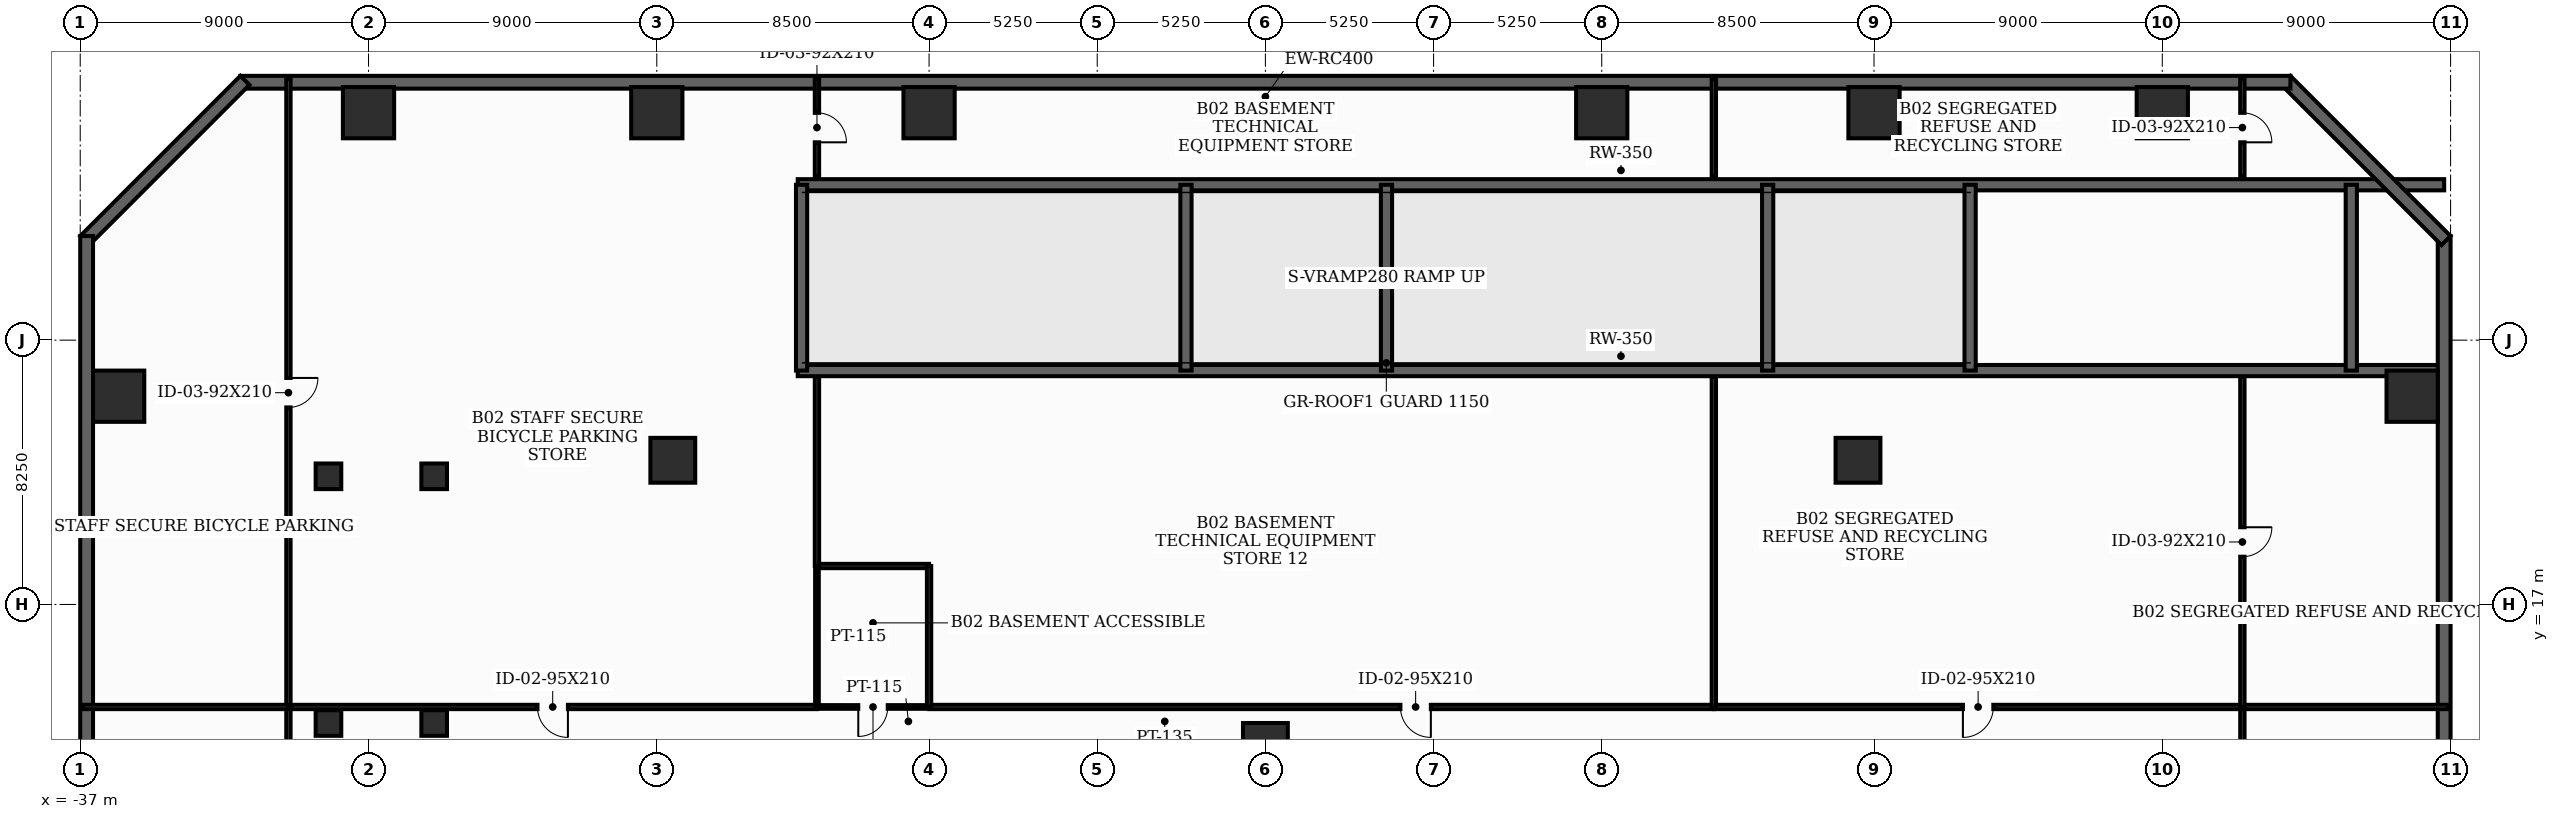
"""IFC4 building model, lengths in metres.
Left out: names, types, materials, properties, quantities, classifications, styles, units other than length and angle.
Written with IfcOpenShell. Run it as: python <this file> out.ifc"""

import sys

from ifc_helpers import new_model, si_unit, direction, frame, frame_2d, origin, origin_2d, place, context, subcontext, project, spatial, rectangle, extrude, element, fill, save


model = new_model("IFC4")
c1 = context("Model", 3, precision=1e-05, world=origin(), true_north=direction((0.0, 1.0)))
c2 = subcontext(c1, "Body", "Model", "MODEL_VIEW")
j1 = project(units=[si_unit("LENGTHUNIT", "METRE"), si_unit("PLANEANGLEUNIT", "RADIAN")], contexts=[c1])
p1 = place(None, origin())
s1 = spatial("IfcSite", under=j1, at=p1, CompositionType="ELEMENT")
p2 = place(p1, origin())
s2 = spatial("IfcBuilding", under=s1, at=p2, CompositionType="ELEMENT")
p3 = place(p2, frame((0.0, 0.0, -9.6)))
s3 = spatial("IfcBuildingStorey", under=s2, at=p3, CompositionType="ELEMENT", Elevation=-9.6)
p4 = place(p3, frame((0.0, 12.6, 0.0), z_axis=(0.0, 0.0, 1.0), x_axis=(1.0, 0.0, 0.0)))
e1 = element("IfcColumn", 1, at=p4, inside=s3, PredefinedType="COLUMN", context=c2, shape_type="SweptSolid", body=[
    extrude(rectangle(XDim=1.4, YDim=1.4, at=origin_2d()), origin(), (0.0, 0.0, 1.0), 4.8),
])
for number, where, z_axis, x_axis in (
    (2, (35.8, 23.5, 0.0), (0.0, 0.0, 1.0), (1.0, 0.0, 0.0)),
    (3, (28.0, 32.35, 0.0), (0.0, 0.0, 1.0), (1.0, 0.0, 0.0)),
    (4, (19.0, 32.35, 0.0), (0.0, 0.0, 1.0), (1.0, 0.0, 0.0)),
    (5, (10.5, 32.35, 0.0), (0.0, 0.0, 1.0), (1.0, 0.0, 0.0)),
    (6, (-10.5, 32.35, 0.0), (0.0, 0.0, 1.0), (1.0, 0.0, 0.0)),
    (7, (-19.0, 32.35, 0.0), (0.0, 0.0, 1.0), (1.0, 0.0, 0.0)),
    (8, (-28.0, 32.35, 0.0), (0.0, 0.0, 1.0), (1.0, 0.0, 0.0)),
    (9, (-35.8, 23.5, 0.0), (0.0, 0.0, 1.0), (1.0, 0.0, 0.0)),
):
    element("IfcColumn", number, at=place(p3, frame(where, z_axis=z_axis, x_axis=x_axis)), inside=s3, PredefinedType="COLUMN", context=c2, shape_type="SweptSolid", body=[
        extrude(rectangle(XDim=1.6, YDim=1.6, at=origin_2d()), origin(), (0.0, 0.0, 1.0), 4.8),
    ])
for number, where, z_axis, x_axis in (
    (10, (-18.5, 21.5, 0.0), (0.0, 0.0, 1.0), (1.0, 0.0, 0.0)),
    (11, (18.5, 21.5, 0.0), (0.0, 0.0, 1.0), (1.0, 0.0, 0.0)),
):
    element("IfcColumn", number, at=place(p3, frame(where, z_axis=z_axis, x_axis=x_axis)), inside=s3, PredefinedType="COLUMN", context=c2, shape_type="SweptSolid", body=[
        extrude(rectangle(XDim=1.4, YDim=1.4, at=origin_2d()), origin(), (0.0, 0.0, 1.0), 4.8),
    ])
for number, where, z_axis, x_axis in (
    (12, (-29.25, 13.3, 0.0), (0.0, 0.0, 1.0), (1.0, 0.0, 0.0)),
    (13, (-25.95, 13.3, 0.0), (0.0, 0.0, 1.0), (1.0, 0.0, 0.0)),
    (14, (-25.95, 21.0, 0.0), (0.0, 0.0, 1.0), (1.0, 0.0, 0.0)),
    (15, (-29.25, 21.0, 0.0), (0.0, 0.0, 1.0), (1.0, 0.0, 0.0)),
):
    element("IfcColumn", number, at=place(p3, frame(where, z_axis=z_axis, x_axis=x_axis)), inside=s3, PredefinedType="COLUMN", context=c2, shape_type="SweptSolid", body=[
        extrude(rectangle(XDim=0.8, YDim=0.8, at=origin_2d()), origin(), (0.0, 0.0, 1.0), 4.8),
    ])
for number, where, z_axis, x_axis in (
    (16, (-14.6, 24.3, 0.0), (0.0, 0.0, 1.0), (1.0, 0.0, 0.0)),
    (17, (-14.6, 30.1, 0.0), (0.0, 0.0, 1.0), (1.0, 0.0, 0.0)),
):
    element("IfcWall", number, at=place(p3, frame(where, z_axis=z_axis, x_axis=x_axis)), inside=s3, PredefinedType="SHEAR", context=c2, shape_type="SweptSolid", body=[
        extrude(rectangle(XDim=51.4, YDim=0.35, at=frame_2d((25.7, 0.0))), origin(), (0.0, 0.0, 1.0), 4.52),
    ])
p5 = place(p3, frame((-14.48, 24.3, 0.0), z_axis=(0.0, 0.0, 1.0), x_axis=(0.0, 1.0, 0.0)))
e18 = element("IfcWall", 18, at=p5, inside=s3, PredefinedType="SHEAR", context=c2, shape_type="SweptSolid", body=[
    extrude(rectangle(XDim=5.8, YDim=0.35, at=frame_2d((2.9, 0.0))), origin(), (0.0, 0.0, 1.0), 4.52),
])
p6 = place(p3, frame((22.0, 24.3, 0.0), z_axis=(0.0, 0.0, 1.0), x_axis=(0.0, 1.0, 0.0)))
e19 = element("IfcWall", 19, at=p6, inside=s3, PredefinedType="SHEAR", context=c2, shape_type="SweptSolid", body=[
    extrude(rectangle(XDim=5.8, YDim=0.35, at=frame_2d((2.9, 0.0))), origin(), (0.0, 0.0, 1.0), 1.2),
])
for number, where, z_axis, x_axis in (
    (20, (33.9, 24.3, 0.0), (0.0, 0.0, 1.0), (0.0, 1.0, 0.0)),
    (21, (-2.48, 24.3, 0.0), (0.0, 0.0, 1.0), (0.0, 1.0, 0.0)),
):
    element("IfcWall", number, at=place(p3, frame(where, z_axis=z_axis, x_axis=x_axis)), inside=s3, PredefinedType="SHEAR", context=c2, shape_type="SweptSolid", body=[
        extrude(rectangle(XDim=5.8, YDim=0.35, at=frame_2d((2.9, 0.0))), origin(), (0.0, 0.0, 1.0), 4.52),
    ])
p7 = place(p3, frame((3.78, 24.3, 0.0), z_axis=(0.0, 0.0, 1.0), x_axis=(0.0, 1.0, 0.0)))
e22 = element("IfcWall", 22, at=p7, inside=s3, PredefinedType="SHEAR", context=c2, shape_type="SweptSolid", body=[
    extrude(rectangle(XDim=5.8, YDim=0.35, at=frame_2d((2.9, 0.0))), origin(), (0.0, 0.0, 1.0), 2.1),
])
p8 = place(p3, frame((15.68, 24.3, 0.0), z_axis=(0.0, 0.0, 1.0), x_axis=(0.0, 1.0, 0.0)))
e23 = element("IfcWall", 23, at=p8, inside=s3, PredefinedType="SHEAR", context=c2, shape_type="SweptSolid", body=[
    extrude(rectangle(XDim=5.8, YDim=0.35, at=frame_2d((2.9, 0.0))), origin(), (0.0, 0.0, 1.0), 4.52),
])
p9 = place(p3, frame((36.8, -19.5, 0.0), z_axis=(0.0, 0.0, 1.0), x_axis=(0.0, 1.0, 0.0)))
e24 = element("IfcWall", 24, at=p9, inside=s3, PredefinedType="USERDEFINED", context=c2, shape_type="SweptSolid", body=[
    extrude(rectangle(XDim=48.0, YDim=0.4, at=frame_2d((24.0, 0.0))), origin(), (0.0, 0.0, 1.0), 4.52),
])
p10 = place(p3, frame((36.859, 28.359, 0.0), z_axis=(0.0, 0.0, 1.0), x_axis=(-0.707106781187, 0.707106781187, 0.0)))
e25 = element("IfcWall", 25, at=p10, inside=s3, PredefinedType="USERDEFINED", context=c2, shape_type="SweptSolid", body=[
    extrude(rectangle(XDim=7.071, YDim=0.4, at=frame_2d((3.536, 0.0))), origin(), (0.0, 0.0, 1.0), 4.52),
])
p11 = place(p3, frame((32.0, 33.3, 0.0), z_axis=(0.0, 0.0, 1.0), x_axis=(-1.0, 0.0, 0.0)))
e26 = element("IfcWall", 26, at=p11, inside=s3, PredefinedType="USERDEFINED", context=c2, shape_type="SweptSolid", body=[
    extrude(rectangle(XDim=64.0, YDim=0.4, at=frame_2d((32.0, 0.0))), origin(), (0.0, 0.0, 1.0), 4.52),
])
p12 = place(p3, frame((-31.859, 33.359, 0.0), z_axis=(0.0, 0.0, 1.0), x_axis=(-0.707106781187, -0.707106781187, 0.0)))
e27 = element("IfcWall", 27, at=p12, inside=s3, PredefinedType="USERDEFINED", context=c2, shape_type="SweptSolid", body=[
    extrude(rectangle(XDim=7.071, YDim=0.4, at=frame_2d((3.536, 0.0))), origin(), (0.0, 0.0, 1.0), 4.52),
])
p13 = place(p3, frame((-36.8, 28.5, 0.0), z_axis=(0.0, 0.0, 1.0), x_axis=(0.0, -1.0, 0.0)))
e28 = element("IfcWall", 28, at=p13, inside=s3, PredefinedType="USERDEFINED", context=c2, shape_type="SweptSolid", body=[
    extrude(rectangle(XDim=48.0, YDim=0.4, at=frame_2d((24.0, 0.0))), origin(), (0.0, 0.0, 1.0), 4.52),
])
p14 = place(p3, frame((30.5, 11.75, 0.0), z_axis=(0.0, 0.0, 1.0), x_axis=(0.0, 1.0, 0.0)))
e29 = element("IfcWall", 29, at=p14, inside=s3, PredefinedType="PARTITIONING", context=c2, shape_type="SweptSolid", body=[
    extrude(rectangle(XDim=2.05, YDim=0.135, at=frame_2d((1.025, 0.0))), origin(), (0.0, 0.0, 1.0), 4.52),
])
p15 = place(p3, frame((30.5, 13.8, 0.0), z_axis=(0.0, 0.0, 1.0), x_axis=(-1.0, 0.0, 0.0)))
e30 = element("IfcWall", 30, at=p15, inside=s3, PredefinedType="PARTITIONING", context=c2, shape_type="SweptSolid", body=[
    extrude(rectangle(XDim=16.5, YDim=0.135, at=frame_2d((8.25, 0.0))), origin(), (0.0, 0.0, 1.0), 3.805),
])
p16 = place(p15, frame((7.775, 0.0, 0.0)))
e31 = element("IfcOpeningElement", 31, at=p16, cuts=e30, PredefinedType="OPENING", context=c2, shape_type="SweptSolid", body=[
    extrude(rectangle(XDim=0.95, YDim=2.1, at=frame_2d((0.475, 1.05))), frame((0.0, 0.077, 0.0), z_axis=(0.0, -1.0, 0.0), x_axis=(1.0, 0.0, 0.0)), (0.0, 0.0, 1.0), 0.155),
])
p17 = place(p3, frame((14.0, 13.8, 0.0), z_axis=(0.0, 0.0, 1.0), x_axis=(-1.0, 0.0, 0.0)))
e32 = element("IfcWall", 32, at=p17, inside=s3, PredefinedType="PARTITIONING", context=c2, shape_type="SweptSolid", body=[
    extrude(rectangle(XDim=24.5, YDim=0.135, at=frame_2d((12.25, 0.0))), origin(), (0.0, 0.0, 1.0), 3.305),
])
p18 = place(p17, frame((8.835, 0.0, 0.0)))
e33 = element("IfcOpeningElement", 33, at=p18, cuts=e32, PredefinedType="OPENING", context=c2, shape_type="SweptSolid", body=[
    extrude(rectangle(XDim=0.95, YDim=2.1, at=frame_2d((0.475, 1.05))), frame((0.0, 0.077, 0.0), z_axis=(0.0, -1.0, 0.0), x_axis=(1.0, 0.0, 0.0)), (0.0, 0.0, 1.0), 0.155),
])
p19 = place(p3, frame((-10.5, 13.8, 0.0), z_axis=(0.0, 0.0, 1.0), x_axis=(-1.0, 0.0, 0.0)))
e34 = element("IfcWall", 34, at=p19, inside=s3, PredefinedType="PARTITIONING", context=c2, shape_type="SweptSolid", body=[
    extrude(rectangle(XDim=3.5, YDim=0.115, at=frame_2d((1.75, 0.0))), origin(), (0.0, 0.0, 1.0), 4.52),
])
p20 = place(p19, frame((1.29, 0.0, 0.0)))
e35 = element("IfcOpeningElement", 35, at=p20, cuts=e34, PredefinedType="OPENING", context=c2, shape_type="SweptSolid", body=[
    extrude(rectangle(XDim=0.92, YDim=2.1, at=frame_2d((0.46, 1.05))), frame((0.0, 0.067, 0.0), z_axis=(0.0, -1.0, 0.0), x_axis=(1.0, 0.0, 0.0)), (0.0, 0.0, 1.0), 0.135),
])
p21 = place(p3, frame((-14.0, 13.8, 0.0), z_axis=(0.0, 0.0, 1.0), x_axis=(-1.0, 0.0, 0.0)))
e36 = element("IfcWall", 36, at=p21, inside=s3, PredefinedType="PARTITIONING", context=c2, shape_type="SweptSolid", body=[
    extrude(rectangle(XDim=16.5, YDim=0.135, at=frame_2d((8.25, 0.0))), origin(), (0.0, 0.0, 1.0), 3.805),
])
p22 = place(p21, frame((7.775, 0.0, 0.0)))
e37 = element("IfcOpeningElement", 37, at=p22, cuts=e36, PredefinedType="OPENING", context=c2, shape_type="SweptSolid", body=[
    extrude(rectangle(XDim=0.95, YDim=2.1, at=frame_2d((0.475, 1.05))), frame((0.0, 0.077, 0.0), z_axis=(0.0, -1.0, 0.0), x_axis=(1.0, 0.0, 0.0)), (0.0, 0.0, 1.0), 0.155),
])
p23 = place(p3, frame((-30.5, 13.8, 0.0), z_axis=(0.0, 0.0, 1.0), x_axis=(0.0, -1.0, 0.0)))
e38 = element("IfcWall", 38, at=p23, inside=s3, PredefinedType="PARTITIONING", context=c2, shape_type="SweptSolid", body=[
    extrude(rectangle(XDim=2.05, YDim=0.135, at=frame_2d((1.025, 0.0))), origin(), (0.0, 0.0, 1.0), 4.52),
])
p24 = place(p3, frame((36.92, 13.8, 0.0), z_axis=(0.0, 0.0, 1.0), x_axis=(-1.0, 0.0, 0.0)))
e39 = element("IfcWall", 39, at=p24, inside=s3, PredefinedType="PARTITIONING", context=c2, shape_type="SweptSolid", body=[
    extrude(rectangle(XDim=6.42, YDim=0.135, at=frame_2d((3.21, 0.0))), origin(), (0.0, 0.0, 1.0), 3.805),
])
p25 = place(p3, frame((30.5, 24.1, 0.0), z_axis=(0.0, 0.0, 1.0), x_axis=(0.0, -1.0, 0.0)))
e40 = element("IfcWall", 40, at=p25, inside=s3, PredefinedType="PARTITIONING", context=c2, shape_type="SweptSolid", body=[
    extrude(rectangle(XDim=10.3, YDim=0.135, at=frame_2d((5.15, 0.0))), origin(), (0.0, 0.0, 1.0), 3.305),
])
p26 = place(p25, frame((4.69, 0.0, 0.0)))
e41 = element("IfcOpeningElement", 41, at=p26, cuts=e40, PredefinedType="OPENING", context=c2, shape_type="SweptSolid", body=[
    extrude(rectangle(XDim=0.92, YDim=2.1, at=frame_2d((0.46, 1.05))), frame((0.0, 0.077, 0.0), z_axis=(0.0, -1.0, 0.0), x_axis=(1.0, 0.0, 0.0)), (0.0, 0.0, 1.0), 0.155),
])
p27 = place(p3, frame((30.5, 33.42, 0.0), z_axis=(0.0, 0.0, 1.0), x_axis=(0.0, -1.0, 0.0)))
e42 = element("IfcWall", 42, at=p27, inside=s3, PredefinedType="PARTITIONING", context=c2, shape_type="SweptSolid", body=[
    extrude(rectangle(XDim=3.07, YDim=0.135, at=frame_2d((1.535, 0.0))), origin(), (0.0, 0.0, 1.0), 4.52),
])
p28 = place(p27, frame((1.075, 0.0, 0.0)))
e43 = element("IfcOpeningElement", 43, at=p28, cuts=e42, PredefinedType="OPENING", context=c2, shape_type="SweptSolid", body=[
    extrude(rectangle(XDim=0.92, YDim=2.1, at=frame_2d((0.46, 1.05))), frame((0.0, 0.077, 0.0), z_axis=(0.0, -1.0, 0.0), x_axis=(1.0, 0.0, 0.0)), (0.0, 0.0, 1.0), 0.155),
])
p29 = place(p3, frame((14.0, 24.1, 0.0), z_axis=(0.0, 0.0, 1.0), x_axis=(0.0, -1.0, 0.0)))
e44 = element("IfcWall", 44, at=p29, inside=s3, PredefinedType="PARTITIONING", context=c2, shape_type="SweptSolid", body=[
    extrude(rectangle(XDim=10.3, YDim=0.135, at=frame_2d((5.15, 0.0))), origin(), (0.0, 0.0, 1.0), 3.305),
])
p30 = place(p3, frame((14.0, 33.42, 0.0), z_axis=(0.0, 0.0, 1.0), x_axis=(0.0, -1.0, 0.0)))
e45 = element("IfcWall", 45, at=p30, inside=s3, PredefinedType="PARTITIONING", context=c2, shape_type="SweptSolid", body=[
    extrude(rectangle(XDim=3.07, YDim=0.135, at=frame_2d((1.535, 0.0))), origin(), (0.0, 0.0, 1.0), 3.805),
])
p31 = place(p3, frame((-14.0, 18.2, 0.0), z_axis=(0.0, 0.0, 1.0), x_axis=(1.0, 0.0, 0.0)))
e46 = element("IfcWall", 46, at=p31, inside=s3, PredefinedType="PARTITIONING", context=c2, shape_type="SweptSolid", body=[
    extrude(rectangle(XDim=3.5, YDim=0.135, at=frame_2d((1.75, 0.0))), origin(), (0.0, 0.0, 1.0), 3.305),
])
p32 = place(p3, frame((-10.5, 18.2, 0.0), z_axis=(0.0, 0.0, 1.0), x_axis=(0.0, -1.0, 0.0)))
e47 = element("IfcWall", 47, at=p32, inside=s3, PredefinedType="PARTITIONING", context=c2, shape_type="SweptSolid", body=[
    extrude(rectangle(XDim=4.4, YDim=0.135, at=frame_2d((2.2, 0.0))), origin(), (0.0, 0.0, 1.0), 3.305),
])
p33 = place(p3, frame((-14.0, 24.1, 0.0), z_axis=(0.0, 0.0, 1.0), x_axis=(0.0, -1.0, 0.0)))
e48 = element("IfcWall", 48, at=p33, inside=s3, PredefinedType="PARTITIONING", context=c2, shape_type="SweptSolid", body=[
    extrude(rectangle(XDim=5.9, YDim=0.135, at=frame_2d((2.95, 0.0))), origin(), (0.0, 0.0, 1.0), 3.305),
])
p34 = place(p3, frame((-14.0, 33.42, 0.0), z_axis=(0.0, 0.0, 1.0), x_axis=(0.0, -1.0, 0.0)))
e49 = element("IfcWall", 49, at=p34, inside=s3, PredefinedType="PARTITIONING", context=c2, shape_type="SweptSolid", body=[
    extrude(rectangle(XDim=3.07, YDim=0.135, at=frame_2d((1.535, 0.0))), origin(), (0.0, 0.0, 1.0), 3.805),
])
p35 = place(p34, frame((1.075, 0.0, 0.0)))
e50 = element("IfcOpeningElement", 50, at=p35, cuts=e49, PredefinedType="OPENING", context=c2, shape_type="SweptSolid", body=[
    extrude(rectangle(XDim=0.92, YDim=2.1, at=frame_2d((0.46, 1.05))), frame((0.0, 0.077, 0.0), z_axis=(0.0, -1.0, 0.0), x_axis=(1.0, 0.0, 0.0)), (0.0, 0.0, 1.0), 0.155),
])
p36 = place(p3, frame((-14.0, 18.2, 0.0), z_axis=(0.0, 0.0, 1.0), x_axis=(0.0, -1.0, 0.0)))
e51 = element("IfcWall", 51, at=p36, inside=s3, PredefinedType="PARTITIONING", context=c2, shape_type="SweptSolid", body=[
    extrude(rectangle(XDim=4.4, YDim=0.115, at=frame_2d((2.2, 0.0))), origin(), (0.0, 0.0, 1.0), 3.805),
])
p37 = place(p3, frame((-30.5, 33.42, 0.0), z_axis=(0.0, 0.0, 1.0), x_axis=(0.0, -1.0, 0.0)))
e52 = element("IfcWall", 52, at=p37, inside=s3, PredefinedType="PARTITIONING", context=c2, shape_type="SweptSolid", body=[
    extrude(rectangle(XDim=19.62, YDim=0.135, at=frame_2d((9.81, 0.0))), origin(), (0.0, 0.0, 1.0), 3.305),
])
p38 = place(p37, frame((9.35, 0.0, 0.0)))
e53 = element("IfcOpeningElement", 53, at=p38, cuts=e52, PredefinedType="OPENING", context=c2, shape_type="SweptSolid", body=[
    extrude(rectangle(XDim=0.92, YDim=2.1, at=frame_2d((0.46, 1.05))), frame((0.0, 0.077, 0.0), z_axis=(0.0, -1.0, 0.0), x_axis=(1.0, 0.0, 0.0)), (0.0, 0.0, 1.0), 0.155),
])
p39 = place(p3, frame((-36.92, 13.8, 0.0), z_axis=(0.0, 0.0, 1.0), x_axis=(1.0, 0.0, 0.0)))
e54 = element("IfcWall", 54, at=p39, inside=s3, PredefinedType="PARTITIONING", context=c2, shape_type="SweptSolid", body=[
    extrude(rectangle(XDim=6.42, YDim=0.135, at=frame_2d((3.21, 0.0))), origin(), (0.0, 0.0, 1.0), 3.805),
])
p40 = place(p16, origin())
e55 = element("IfcDoor", 55, at=p40, inside=s3, OperationType="SINGLE_SWING_RIGHT", PredefinedType="DOOR", context=c2, shape_type="SweptSolid", body=[
    extrude(rectangle(XDim=0.95, YDim=2.1, at=frame_2d((0.475, 1.05))), frame((0.0, 0.025, 0.0), z_axis=(0.0, -1.0, 0.0), x_axis=(1.0, 0.0, 0.0)), (0.0, 0.0, 1.0), 0.05),
])
fill(e31, e55)
p41 = place(p18, origin())
e56 = element("IfcDoor", 56, at=p41, inside=s3, OperationType="SINGLE_SWING_LEFT", PredefinedType="DOOR", context=c2, shape_type="SweptSolid", body=[
    extrude(rectangle(XDim=0.95, YDim=2.1, at=frame_2d((0.475, 1.05))), frame((0.0, 0.025, 0.0), z_axis=(0.0, -1.0, 0.0), x_axis=(1.0, 0.0, 0.0)), (0.0, 0.0, 1.0), 0.05),
])
fill(e33, e56)
p42 = place(p20, origin())
e57 = element("IfcDoor", 57, at=p42, inside=s3, OperationType="SINGLE_SWING_RIGHT", PredefinedType="DOOR", context=c2, shape_type="SweptSolid", body=[
    extrude(rectangle(XDim=0.92, YDim=2.1, at=frame_2d((0.46, 1.05))), frame((0.0, 0.025, 0.0), z_axis=(0.0, -1.0, 0.0), x_axis=(1.0, 0.0, 0.0)), (0.0, 0.0, 1.0), 0.05),
])
fill(e35, e57)
p43 = place(p22, origin())
e58 = element("IfcDoor", 58, at=p43, inside=s3, OperationType="SINGLE_SWING_LEFT", PredefinedType="DOOR", context=c2, shape_type="SweptSolid", body=[
    extrude(rectangle(XDim=0.95, YDim=2.1, at=frame_2d((0.475, 1.05))), frame((0.0, 0.025, 0.0), z_axis=(0.0, -1.0, 0.0), x_axis=(1.0, 0.0, 0.0)), (0.0, 0.0, 1.0), 0.05),
])
fill(e37, e58)
p44 = place(p26, origin())
e59 = element("IfcDoor", 59, at=p44, inside=s3, OperationType="SINGLE_SWING_LEFT", PredefinedType="DOOR", context=c2, shape_type="SweptSolid", body=[
    extrude(rectangle(XDim=0.92, YDim=2.1, at=frame_2d((0.46, 1.05))), frame((0.0, 0.025, 0.0), z_axis=(0.0, -1.0, 0.0), x_axis=(1.0, 0.0, 0.0)), (0.0, 0.0, 1.0), 0.05),
])
fill(e41, e59)
p45 = place(p28, origin())
e60 = element("IfcDoor", 60, at=p45, inside=s3, OperationType="SINGLE_SWING_RIGHT", PredefinedType="DOOR", context=c2, shape_type="SweptSolid", body=[
    extrude(rectangle(XDim=0.92, YDim=2.1, at=frame_2d((0.46, 1.05))), frame((0.0, 0.025, 0.0), z_axis=(0.0, -1.0, 0.0), x_axis=(1.0, 0.0, 0.0)), (0.0, 0.0, 1.0), 0.05),
])
fill(e43, e60)
p46 = place(p35, origin())
e61 = element("IfcDoor", 61, at=p46, inside=s3, OperationType="SINGLE_SWING_RIGHT", PredefinedType="DOOR", context=c2, shape_type="SweptSolid", body=[
    extrude(rectangle(XDim=0.92, YDim=2.1, at=frame_2d((0.46, 1.05))), frame((0.0, 0.025, 0.0), z_axis=(0.0, -1.0, 0.0), x_axis=(1.0, 0.0, 0.0)), (0.0, 0.0, 1.0), 0.05),
])
fill(e50, e61)
p47 = place(p38, origin())
e62 = element("IfcDoor", 62, at=p47, inside=s3, OperationType="SINGLE_SWING_LEFT", PredefinedType="DOOR", context=c2, shape_type="SweptSolid", body=[
    extrude(rectangle(XDim=0.92, YDim=2.1, at=frame_2d((0.46, 1.05))), frame((0.0, 0.025, 0.0), z_axis=(0.0, -1.0, 0.0), x_axis=(1.0, 0.0, 0.0)), (0.0, 0.0, 1.0), 0.05),
])
fill(e53, e62)
save(model, sys.argv[1])
